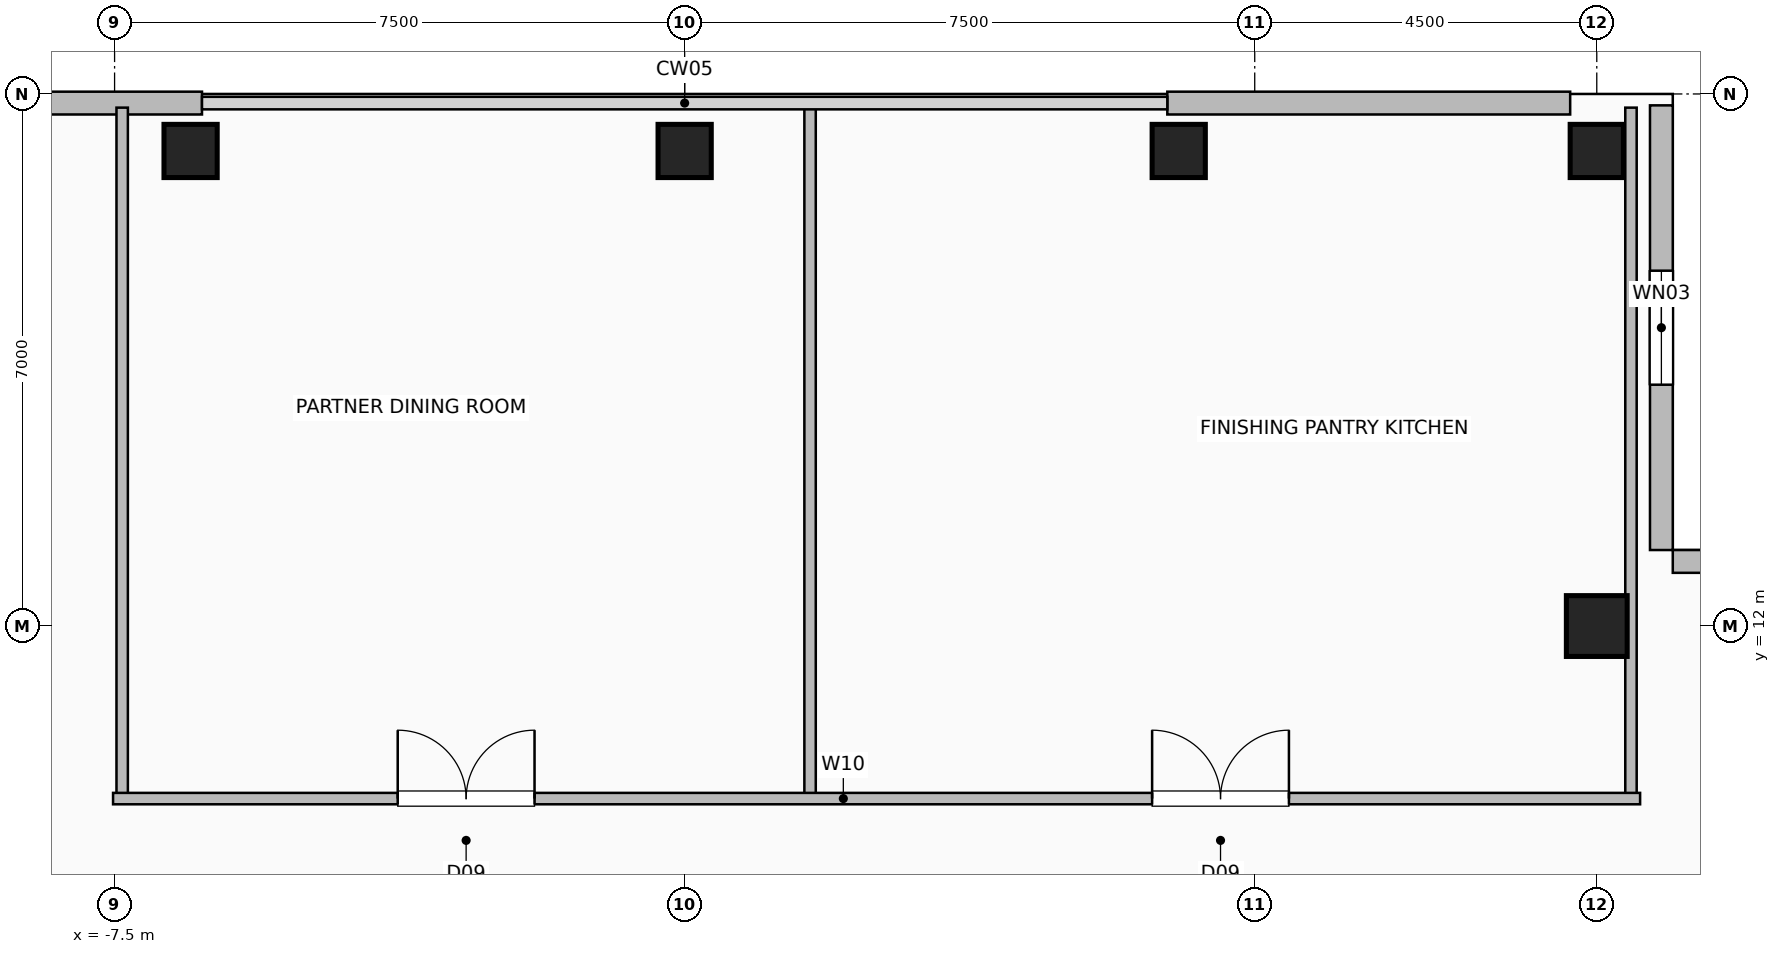
"""IFC4 building model, lengths in metres.
Left out: names, types, materials, properties, quantities, classifications, styles, units other than length and angle.
Written with IfcOpenShell. Run it as: python <this file> out.ifc"""

import sys

from ifc_helpers import new_model, si_unit, direction, frame, frame_2d, origin, origin_2d, place, context, subcontext, project, spatial, rectangle, hollow_rectangle, extrude, element, fill, save


model = new_model("IFC4")
c1 = context("Model", 3, precision=1e-05, world=origin(), true_north=direction((0.0, 1.0)))
c2 = subcontext(c1, "Body", "Model", "MODEL_VIEW")
j1 = project(units=[si_unit("LENGTHUNIT", "METRE"), si_unit("PLANEANGLEUNIT", "RADIAN")], contexts=[c1])
p1 = place(None, origin())
s1 = spatial("IfcSite", under=j1, at=p1, CompositionType="ELEMENT")
p2 = place(p1, origin())
s2 = spatial("IfcBuilding", under=s1, at=p2, CompositionType="ELEMENT")
p3 = place(p2, frame((0.0, 0.0, 279.2)))
s3 = spatial("IfcBuildingStorey", under=s2, at=p3, CompositionType="ELEMENT", Elevation=279.2)
for number, where, z_axis, x_axis in (
    (1, (-6.5, 18.25, 0.0), (0.0, 0.0, 1.0), (1.0, 0.0, 0.0)),
    (2, (0.0, 18.25, 0.0), (0.0, 0.0, 1.0), (1.0, 0.0, 0.0)),
    (3, (6.5, 18.25, 0.0), (0.0, 0.0, 1.0), (1.0, 0.0, 0.0)),
    (4, (12.0, 18.25, 0.0), (0.0, 0.0, 1.0), (1.0, 0.0, 0.0)),
):
    element("IfcColumn", number, at=place(p3, frame(where, z_axis=z_axis, x_axis=x_axis)), inside=s3, PredefinedType="COLUMN", context=c2, shape_type="SweptSolid", body=[
        extrude(hollow_rectangle(XDim=0.7, YDim=0.7, WallThickness=0.035, at=origin_2d()), origin(), (0.0, 0.0, 1.0), 3.6),
    ])
p4 = place(p3, frame((12.0, 12.0, 0.0), z_axis=(0.0, 0.0, 1.0), x_axis=(1.0, 0.0, 0.0)))
e5 = element("IfcColumn", 5, at=p4, inside=s3, PredefinedType="COLUMN", context=c2, shape_type="SweptSolid", body=[
    extrude(hollow_rectangle(XDim=0.8, YDim=0.8, WallThickness=0.04, at=origin_2d()), origin(), (0.0, 0.0, 1.0), 3.6),
])
for number, where, z_axis, x_axis in (
    (6, (-11.65, 18.88, 0.0), (0.0, 0.0, 1.0), (1.0, 0.0, 0.0)),
    (7, (6.35, 18.88, 0.0), (0.0, 0.0, 1.0), (1.0, 0.0, 0.0)),
):
    element("IfcWall", number, at=place(p3, frame(where, z_axis=z_axis, x_axis=x_axis)), inside=s3, PredefinedType="SOLIDWALL", context=c2, shape_type="SweptSolid", body=[
        extrude(rectangle(XDim=5.3, YDim=0.3, at=frame_2d((2.65, 0.0))), origin(), (0.0, 0.0, 1.0), 3.36),
    ])
p5 = place(p3, frame((12.85, 18.85, 0.0), z_axis=(0.0, 0.0, 1.0), x_axis=(0.0, -1.0, 0.0)))
e8 = element("IfcWall", 8, at=p5, inside=s3, PredefinedType="SOLIDWALL", context=c2, shape_type="SweptSolid", body=[
    extrude(rectangle(XDim=5.85, YDim=0.3, at=frame_2d((2.925, 0.0))), origin(), (0.0, 0.0, 1.0), 3.36),
])
p6 = place(p5, frame((2.175, 0.0, 0.9)))
e9 = element("IfcOpeningElement", 9, at=p6, cuts=e8, PredefinedType="OPENING", context=c2, shape_type="SweptSolid", body=[
    extrude(rectangle(XDim=1.5, YDim=1.8, at=frame_2d((0.75, 0.9))), frame((0.0, 0.16, 0.0), z_axis=(0.0, -1.0, 0.0), x_axis=(1.0, 0.0, 0.0)), (0.0, 0.0, 1.0), 0.32),
])
p7 = place(p3, frame((18.85, 12.85, 0.0), z_axis=(0.0, 0.0, 1.0), x_axis=(-1.0, 0.0, 0.0)))
e10 = element("IfcWall", 10, at=p7, inside=s3, PredefinedType="SOLIDWALL", context=c2, shape_type="SweptSolid", body=[
    extrude(rectangle(XDim=5.85, YDim=0.3, at=frame_2d((2.925, 0.0))), origin(), (0.0, 0.0, 1.0), 3.36),
])
for number, where, z_axis, x_axis in (
    (11, (-7.4, 9.73, 0.0), (0.0, 0.0, 1.0), (0.0, 1.0, 0.0)),
    (12, (1.65, 9.73, 0.0), (0.0, 0.0, 1.0), (0.0, 1.0, 0.0)),
    (13, (12.45, 9.73, 0.0), (0.0, 0.0, 1.0), (0.0, 1.0, 0.0)),
):
    element("IfcWall", number, at=place(p3, frame(where, z_axis=z_axis, x_axis=x_axis)), inside=s3, PredefinedType="PARTITIONING", context=c2, shape_type="SweptSolid", body=[
        extrude(rectangle(XDim=9.09, YDim=0.15, at=frame_2d((4.545, 0.0))), origin(), (0.0, 0.0, 1.0), 3.36),
    ])
p8 = place(p3, frame((-7.52, 9.73, 0.0), z_axis=(0.0, 0.0, 1.0), x_axis=(1.0, 0.0, 0.0)))
e14 = element("IfcWall", 14, at=p8, inside=s3, PredefinedType="PARTITIONING", context=c2, shape_type="SweptSolid", body=[
    extrude(rectangle(XDim=20.09, YDim=0.15, at=frame_2d((10.045, 0.0))), origin(), (0.0, 0.0, 1.0), 3.36),
])
p9 = place(p8, frame((3.745, 0.0, 0.0)))
e15 = element("IfcOpeningElement", 15, at=p9, cuts=e14, PredefinedType="OPENING", context=c2, shape_type="SweptSolid", body=[
    extrude(rectangle(XDim=1.8, YDim=2.08, at=frame_2d((0.9, 1.04))), frame((0.0, 0.085, 0.0), z_axis=(0.0, -1.0, 0.0), x_axis=(1.0, 0.0, 0.0)), (0.0, 0.0, 1.0), 0.17),
])
p10 = place(p8, frame((13.67, 0.0, 0.0)))
e16 = element("IfcOpeningElement", 16, at=p10, cuts=e14, PredefinedType="OPENING", context=c2, shape_type="SweptSolid", body=[
    extrude(rectangle(XDim=1.8, YDim=2.08, at=frame_2d((0.9, 1.04))), frame((0.0, 0.085, 0.0), z_axis=(0.0, -1.0, 0.0), x_axis=(1.0, 0.0, 0.0)), (0.0, 0.0, 1.0), 0.17),
])
p11 = place(p6, origin())
e17 = element("IfcWindow", 17, at=p11, inside=s3, PartitioningType="SINGLE_PANEL", PredefinedType="WINDOW", context=c2, shape_type="SweptSolid", body=[
    extrude(rectangle(XDim=1.5, YDim=1.8, at=frame_2d((0.75, 0.9))), frame((0.0, 0.03, 0.0), z_axis=(0.0, -1.0, 0.0), x_axis=(1.0, 0.0, 0.0)), (0.0, 0.0, 1.0), 0.06),
])
fill(e9, e17)
p12 = place(p9, origin())
e18 = element("IfcDoor", 18, at=p12, inside=s3, OperationType="DOUBLE_DOOR_SINGLE_SWING", PredefinedType="DOOR", context=c2, shape_type="SweptSolid", body=[
    extrude(rectangle(XDim=1.8, YDim=2.08, at=frame_2d((0.9, 1.04))), frame((0.0, 0.025, 0.0), z_axis=(0.0, -1.0, 0.0), x_axis=(1.0, 0.0, 0.0)), (0.0, 0.0, 1.0), 0.05),
])
fill(e15, e18)
p13 = place(p10, origin())
e19 = element("IfcDoor", 19, at=p13, inside=s3, OperationType="DOUBLE_DOOR_SINGLE_SWING", PredefinedType="DOOR", context=c2, shape_type="SweptSolid", body=[
    extrude(rectangle(XDim=1.8, YDim=2.08, at=frame_2d((0.9, 1.04))), frame((0.0, 0.025, 0.0), z_axis=(0.0, -1.0, 0.0), x_axis=(1.0, 0.0, 0.0)), (0.0, 0.0, 1.0), 0.05),
])
fill(e16, e19)
save(model, sys.argv[1])
